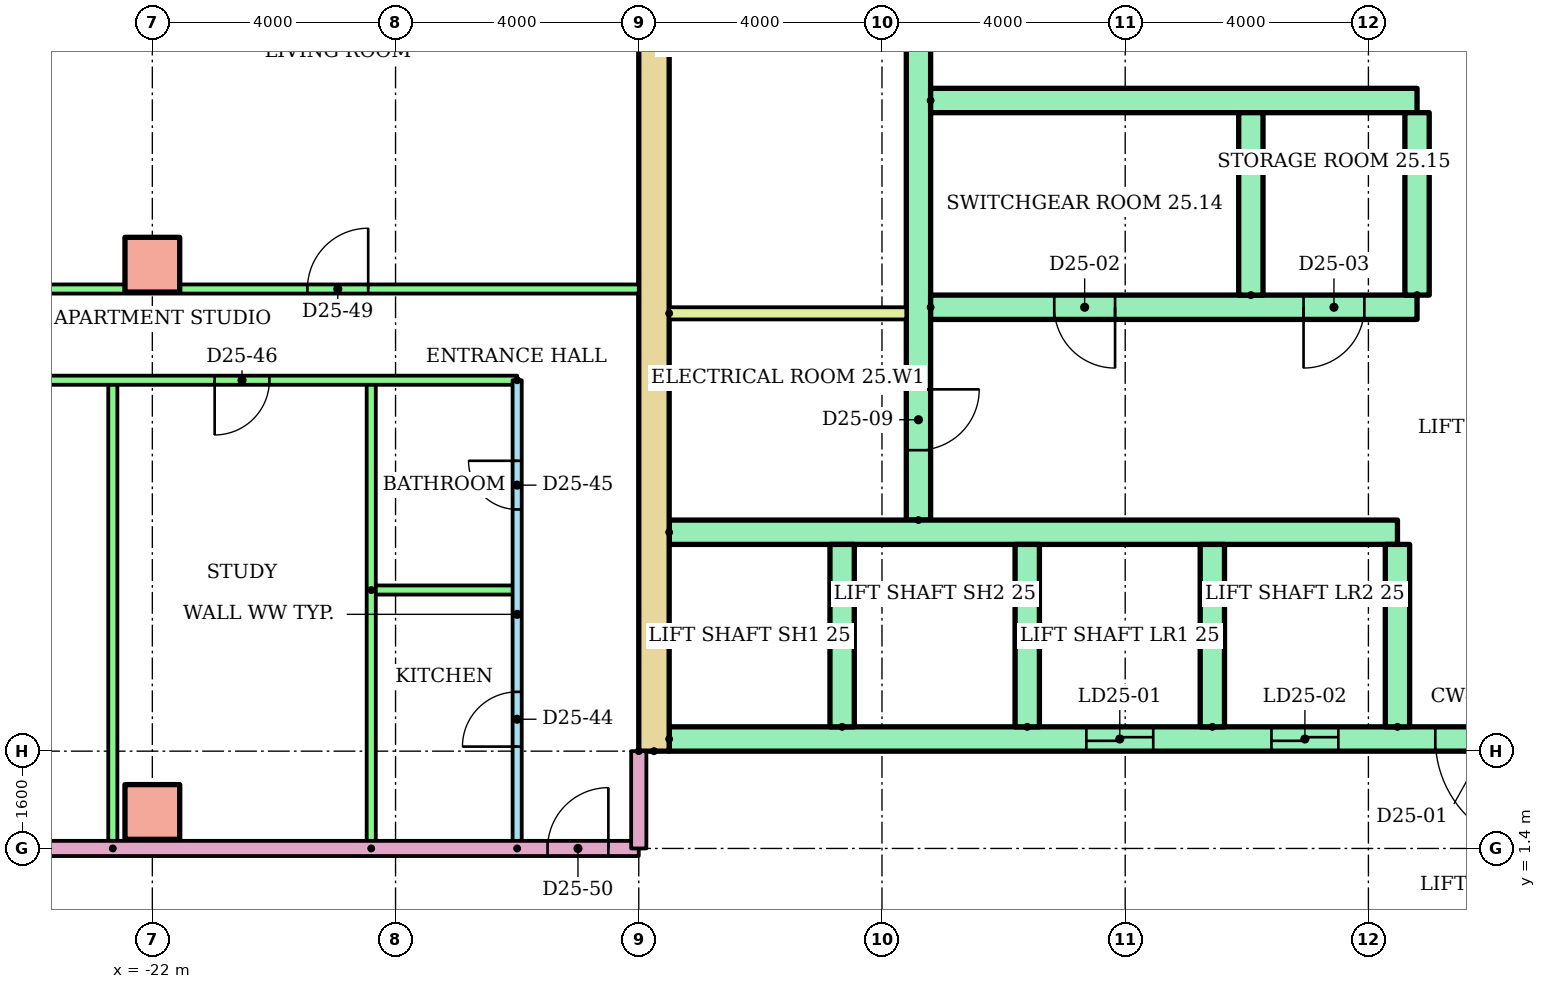
"""IFC4 building model, lengths in metres.
Left out: names, types, materials, properties, quantities, classifications, styles, units other than length and angle.
Written with IfcOpenShell. Run it as: python <this file> out.ifc"""

import sys

from ifc_helpers import new_model, si_unit, direction, frame, frame_2d, origin, origin_2d, place, context, subcontext, project, spatial, rectangle, extrude, element, fill, save


model = new_model("IFC4")
c1 = context("Model", 3, precision=1e-05, world=origin(), true_north=direction((0.0, 1.0)))
c2 = subcontext(c1, "Body", "Model", "MODEL_VIEW")
j1 = project(units=[si_unit("LENGTHUNIT", "METRE"), si_unit("PLANEANGLEUNIT", "RADIAN")], contexts=[c1])
p1 = place(None, origin())
s1 = spatial("IfcSite", under=j1, at=p1, CompositionType="ELEMENT")
p2 = place(p1, origin())
s2 = spatial("IfcBuilding", under=s1, at=p2, CompositionType="ELEMENT")
p3 = place(p2, frame((0.0, 0.0, 96.7)))
s3 = spatial("IfcBuildingStorey", under=s2, at=p3, CompositionType="ELEMENT", Elevation=96.7)
for number, where in (
    (1, (-22.0, 2.0, 0.0)),
    (2, (-22.0, 11.0, 0.0)),
):
    element("IfcColumn", number, at=place(p3, frame(where)), inside=s3, PredefinedType="COLUMN", context=c2, shape_type="SweptSolid", body=[
        extrude(rectangle(XDim=0.9, YDim=0.9, at=origin_2d()), origin(), (0.0, 0.0, 1.0), 3.2),
    ])
p4 = place(p3, frame((-13.75, 3.0, 0.0), z_axis=(0.0, 0.0, 1.0), x_axis=(0.0, 1.0, 0.0)))
e3 = element("IfcWall", 3, at=p4, inside=s3, PredefinedType="SHEAR", context=c2, shape_type="SweptSolid", body=[
    extrude(rectangle(XDim=17.0, YDim=0.5, at=frame_2d((8.5, 0.0))), origin(), (0.0, 0.0, 1.0), 2.92),
])
p5 = place(p3, frame((-9.4, 6.8, 0.0), z_axis=(0.0, 0.0, 1.0), x_axis=(0.0, 1.0, 0.0)))
e4 = element("IfcWall", 4, at=p5, inside=s3, PredefinedType="SHEAR", context=c2, shape_type="SweptSolid", body=[
    extrude(rectangle(XDim=12.7, YDim=0.4, at=frame_2d((6.35, 0.0))), origin(), (0.0, 0.0, 1.0), 2.92),
])
p6 = place(p5, frame((1.15, 0.0, 0.0)))
e5 = element("IfcOpeningElement", 5, at=p6, cuts=e4, PredefinedType="OPENING", context=c2, shape_type="SweptSolid", body=[
    extrude(rectangle(XDim=1.0, YDim=2.1, at=frame_2d((0.5, 1.05))), frame((0.0, 0.21, 0.0), z_axis=(0.0, -1.0, 0.0), x_axis=(1.0, 0.0, 0.0)), (0.0, 0.0, 1.0), 0.42),
])
p7 = place(p5, frame((7.925, 0.0, 0.0)))
e6 = element("IfcOpeningElement", 6, at=p7, cuts=e4, PredefinedType="OPENING", context=c2, shape_type="SweptSolid", body=[
    extrude(rectangle(XDim=1.0, YDim=2.1, at=frame_2d((0.5, 1.05))), frame((0.0, 0.21, 0.0), z_axis=(0.0, -1.0, 0.0), x_axis=(1.0, 0.0, 0.0)), (0.0, 0.0, 1.0), 0.42),
])
p8 = place(p3, frame((-13.5, 3.2, 0.0)))
e7 = element("IfcWall", 7, at=p8, inside=s3, PredefinedType="SHEAR", context=c2, shape_type="SweptSolid", body=[
    extrude(rectangle(XDim=27.0, YDim=0.4, at=frame_2d((13.5, 0.0))), origin(), (0.0, 0.0, 1.0), 2.92),
])
p9 = place(p8, frame((6.861, 0.0, 0.0)))
e8 = element("IfcOpeningElement", 8, at=p9, cuts=e7, PredefinedType="OPENING", context=c2, shape_type="SweptSolid", body=[
    extrude(rectangle(XDim=1.1, YDim=2.1, at=frame_2d((0.55, 1.05))), frame((0.0, 0.21, 0.0), z_axis=(0.0, -1.0, 0.0), x_axis=(1.0, 0.0, 0.0)), (0.0, 0.0, 1.0), 0.42),
])
p10 = place(p8, frame((9.906, 0.0, 0.0)))
e9 = element("IfcOpeningElement", 9, at=p10, cuts=e7, PredefinedType="OPENING", context=c2, shape_type="SweptSolid", body=[
    extrude(rectangle(XDim=1.1, YDim=2.1, at=frame_2d((0.55, 1.05))), frame((0.0, 0.21, 0.0), z_axis=(0.0, -1.0, 0.0), x_axis=(1.0, 0.0, 0.0)), (0.0, 0.0, 1.0), 0.42),
])
p11 = place(p8, frame((15.994, 0.0, 0.0)))
e10 = element("IfcOpeningElement", 10, at=p11, cuts=e7, PredefinedType="OPENING", context=c2, shape_type="SweptSolid", body=[
    extrude(rectangle(XDim=1.1, YDim=2.1, at=frame_2d((0.55, 1.05))), frame((0.0, 0.21, 0.0), z_axis=(0.0, -1.0, 0.0), x_axis=(1.0, 0.0, 0.0)), (0.0, 0.0, 1.0), 0.42),
])
p12 = place(p8, frame((19.039, 0.0, 0.0)))
e11 = element("IfcOpeningElement", 11, at=p12, cuts=e7, PredefinedType="OPENING", context=c2, shape_type="SweptSolid", body=[
    extrude(rectangle(XDim=1.1, YDim=2.1, at=frame_2d((0.55, 1.05))), frame((0.0, 0.21, 0.0), z_axis=(0.0, -1.0, 0.0), x_axis=(1.0, 0.0, 0.0)), (0.0, 0.0, 1.0), 0.42),
])
p13 = place(p8, frame((12.6, 0.0, 0.0)))
e12 = element("IfcOpeningElement", 12, at=p13, cuts=e7, PredefinedType="OPENING", context=c2, shape_type="SweptSolid", body=[
    extrude(rectangle(XDim=1.8, YDim=2.1, at=frame_2d((0.9, 1.05))), frame((0.0, 0.21, 0.0), z_axis=(0.0, -1.0, 0.0), x_axis=(1.0, 0.0, 0.0)), (0.0, 0.0, 1.0), 0.42),
])
p14 = place(p3, frame((-13.5, 6.6, 0.0)))
e13 = element("IfcWall", 13, at=p14, inside=s3, PredefinedType="SHEAR", context=c2, shape_type="SweptSolid", body=[
    extrude(rectangle(XDim=11.978, YDim=0.4, at=frame_2d((5.989, 0.0))), origin(), (0.0, 0.0, 1.0), 2.92),
])
for number, where, z_axis, x_axis in (
    (14, (-10.656, 3.4, 0.0), (0.0, 0.0, 1.0), (0.0, 1.0, 0.0)),
    (15, (-7.611, 3.4, 0.0), (0.0, 0.0, 1.0), (0.0, 1.0, 0.0)),
    (16, (-4.567, 3.4, 0.0), (0.0, 0.0, 1.0), (0.0, 1.0, 0.0)),
    (17, (-1.522, 3.4, 0.0), (0.0, 0.0, 1.0), (0.0, 1.0, 0.0)),
):
    element("IfcWall", number, at=place(p3, frame(where, z_axis=z_axis, x_axis=x_axis)), inside=s3, PredefinedType="SHEAR", context=c2, shape_type="SweptSolid", body=[
        extrude(rectangle(XDim=3.0, YDim=0.4, at=frame_2d((1.5, 0.0))), origin(), (0.0, 0.0, 1.0), 2.92),
    ])
p15 = place(p3, frame((-9.2, 10.3, 0.0)))
e18 = element("IfcWall", 18, at=p15, inside=s3, PredefinedType="SHEAR", context=c2, shape_type="SweptSolid", body=[
    extrude(rectangle(XDim=8.0, YDim=0.4, at=frame_2d((4.0, 0.0))), origin(), (0.0, 0.0, 1.0), 2.92),
])
p16 = place(p15, frame((2.033, 0.0, 0.0)))
e19 = element("IfcOpeningElement", 19, at=p16, cuts=e18, PredefinedType="OPENING", context=c2, shape_type="SweptSolid", body=[
    extrude(rectangle(XDim=1.0, YDim=2.1, at=frame_2d((0.5, 1.05))), frame((0.0, 0.21, 0.0), z_axis=(0.0, -1.0, 0.0), x_axis=(1.0, 0.0, 0.0)), (0.0, 0.0, 1.0), 0.42),
])
p17 = place(p15, frame((6.133, 0.0, 0.0)))
e20 = element("IfcOpeningElement", 20, at=p17, cuts=e18, PredefinedType="OPENING", context=c2, shape_type="SweptSolid", body=[
    extrude(rectangle(XDim=1.0, YDim=2.1, at=frame_2d((0.5, 1.05))), frame((0.0, 0.21, 0.0), z_axis=(0.0, -1.0, 0.0), x_axis=(1.0, 0.0, 0.0)), (0.0, 0.0, 1.0), 0.42),
])
p18 = place(p3, frame((-9.2, 13.7, 0.0)))
e21 = element("IfcWall", 21, at=p18, inside=s3, PredefinedType="SHEAR", context=c2, shape_type="SweptSolid", body=[
    extrude(rectangle(XDim=8.0, YDim=0.4, at=frame_2d((4.0, 0.0))), origin(), (0.0, 0.0, 1.0), 2.92),
])
for number, where, z_axis, x_axis in (
    (22, (-3.933, 10.5, 0.0), (0.0, 0.0, 1.0), (0.0, 1.0, 0.0)),
    (23, (-1.2, 10.5, 0.0), (0.0, 0.0, 1.0), (0.0, 1.0, 0.0)),
):
    element("IfcWall", number, at=place(p3, frame(where, z_axis=z_axis, x_axis=x_axis)), inside=s3, PredefinedType="SHEAR", context=c2, shape_type="SweptSolid", body=[
        extrude(rectangle(XDim=3.0, YDim=0.4, at=frame_2d((1.5, 0.0))), origin(), (0.0, 0.0, 1.0), 2.92),
    ])
p19 = place(p3, frame((-13.5, 10.2, 0.0)))
e24 = element("IfcWall", 24, at=p19, inside=s3, PredefinedType="PARTITIONING", context=c2, shape_type="SweptSolid", body=[
    extrude(rectangle(XDim=3.9, YDim=0.2, at=frame_2d((1.95, 0.0))), origin(), (0.0, 0.0, 1.0), 2.92),
])
p20 = place(p3, frame((-16.0, 1.4, 0.0), z_axis=(0.0, 0.0, 1.0), x_axis=(0.0, 1.0, 0.0)))
e25 = element("IfcWall", 25, at=p20, inside=s3, PredefinedType="PARTITIONING", context=c2, shape_type="SweptSolid", body=[
    extrude(rectangle(XDim=7.7, YDim=0.15, at=frame_2d((3.85, 0.0))), origin(), (0.0, 0.0, 1.0), 2.4),
])
p21 = place(p20, frame((1.675, 0.0, 0.0)))
e26 = element("IfcOpeningElement", 26, at=p21, cuts=e25, PredefinedType="OPENING", context=c2, shape_type="SweptSolid", body=[
    extrude(rectangle(XDim=0.9, YDim=2.1, at=frame_2d((0.45, 1.05))), frame((0.0, 0.085, 0.0), z_axis=(0.0, -1.0, 0.0), x_axis=(1.0, 0.0, 0.0)), (0.0, 0.0, 1.0), 0.17),
])
p22 = place(p20, frame((5.575, 0.0, 0.0)))
e27 = element("IfcOpeningElement", 27, at=p22, cuts=e25, PredefinedType="OPENING", context=c2, shape_type="SweptSolid", body=[
    extrude(rectangle(XDim=0.8, YDim=2.1, at=frame_2d((0.4, 1.05))), frame((0.0, 0.085, 0.0), z_axis=(0.0, -1.0, 0.0), x_axis=(1.0, 0.0, 0.0)), (0.0, 0.0, 1.0), 0.17),
])
p23 = place(p3, frame((-18.4, 5.65, 0.0)))
e28 = element("IfcWall", 28, at=p23, inside=s3, PredefinedType="PARTITIONING", context=c2, shape_type="SweptSolid", body=[
    extrude(rectangle(XDim=2.4, YDim=0.15, at=frame_2d((1.2, 0.0))), origin(), (0.0, 0.0, 1.0), 2.4),
])
for number, where, z_axis, x_axis in (
    (29, (-18.4, 1.4, 0.0), (0.0, 0.0, 1.0), (0.0, 1.0, 0.0)),
    (30, (-22.65, 1.4, 0.0), (0.0, 0.0, 1.0), (0.0, 1.0, 0.0)),
):
    element("IfcWall", number, at=place(p3, frame(where, z_axis=z_axis, x_axis=x_axis)), inside=s3, PredefinedType="PARTITIONING", context=c2, shape_type="SweptSolid", body=[
        extrude(rectangle(XDim=7.7, YDim=0.15, at=frame_2d((3.85, 0.0))), origin(), (0.0, 0.0, 1.0), 2.4),
    ])
p24 = place(p3, frame((-16.0, 9.1, 0.0), z_axis=(0.0, 0.0, 1.0), x_axis=(-1.0, 0.0, 0.0)))
e31 = element("IfcWall", 31, at=p24, inside=s3, PredefinedType="PARTITIONING", context=c2, shape_type="SweptSolid", body=[
    extrude(rectangle(XDim=12.62, YDim=0.15, at=frame_2d((6.31, 0.0))), origin(), (0.0, 0.0, 1.0), 2.4),
])
p25 = place(p24, frame((4.075, 0.0, 0.0)))
e32 = element("IfcOpeningElement", 32, at=p25, cuts=e31, PredefinedType="OPENING", context=c2, shape_type="SweptSolid", body=[
    extrude(rectangle(XDim=0.9, YDim=2.1, at=frame_2d((0.45, 1.05))), frame((0.0, 0.085, 0.0), z_axis=(0.0, -1.0, 0.0), x_axis=(1.0, 0.0, 0.0)), (0.0, 0.0, 1.0), 0.17),
])
p26 = place(p24, frame((9.075, 0.0, 0.0)))
e33 = element("IfcOpeningElement", 33, at=p26, cuts=e31, PredefinedType="OPENING", context=c2, shape_type="SweptSolid", body=[
    extrude(rectangle(XDim=0.9, YDim=2.1, at=frame_2d((0.45, 1.05))), frame((0.0, 0.085, 0.0), z_axis=(0.0, -1.0, 0.0), x_axis=(1.0, 0.0, 0.0)), (0.0, 0.0, 1.0), 0.17),
])
p27 = place(p3, frame((-28.62, 10.6, 0.0)))
e34 = element("IfcWall", 34, at=p27, inside=s3, PredefinedType="PARTITIONING", context=c2, shape_type="SweptSolid", body=[
    extrude(rectangle(XDim=14.62, YDim=0.15, at=frame_2d((7.31, 0.0))), origin(), (0.0, 0.0, 1.0), 2.4),
])
p28 = place(p27, frame((1.97, 0.0, 0.0)))
e35 = element("IfcOpeningElement", 35, at=p28, cuts=e34, PredefinedType="OPENING", context=c2, shape_type="SweptSolid", body=[
    extrude(rectangle(XDim=1.0, YDim=2.1, at=frame_2d((0.5, 1.05))), frame((0.0, 0.085, 0.0), z_axis=(0.0, -1.0, 0.0), x_axis=(1.0, 0.0, 0.0)), (0.0, 0.0, 1.0), 0.17),
])
p29 = place(p27, frame((9.17, 0.0, 0.0)))
e36 = element("IfcOpeningElement", 36, at=p29, cuts=e34, PredefinedType="OPENING", context=c2, shape_type="SweptSolid", body=[
    extrude(rectangle(XDim=1.0, YDim=2.1, at=frame_2d((0.5, 1.05))), frame((0.0, 0.085, 0.0), z_axis=(0.0, -1.0, 0.0), x_axis=(1.0, 0.0, 0.0)), (0.0, 0.0, 1.0), 0.17),
])
p30 = place(p3, frame((-28.62, 1.4, 0.0)))
e37 = element("IfcWall", 37, at=p30, inside=s3, PredefinedType="PARTITIONING", context=c2, shape_type="SweptSolid", body=[
    extrude(rectangle(XDim=14.62, YDim=0.25, at=frame_2d((7.31, 0.0))), origin(), (0.0, 0.0, 1.0), 2.4),
])
p31 = place(p30, frame((13.12, 0.0, 0.0)))
e38 = element("IfcOpeningElement", 38, at=p31, cuts=e37, PredefinedType="OPENING", context=c2, shape_type="SweptSolid", body=[
    extrude(rectangle(XDim=1.0, YDim=2.1, at=frame_2d((0.5, 1.05))), frame((0.0, 0.135, 0.0), z_axis=(0.0, -1.0, 0.0), x_axis=(1.0, 0.0, 0.0)), (0.0, 0.0, 1.0), 0.27),
])
p32 = place(p3, frame((-14.0, 3.0, 0.0), z_axis=(0.0, 0.0, 1.0), x_axis=(0.0, -1.0, 0.0)))
e39 = element("IfcWall", 39, at=p32, inside=s3, PredefinedType="PARTITIONING", context=c2, shape_type="SweptSolid", body=[
    extrude(rectangle(XDim=1.6, YDim=0.25, at=frame_2d((0.8, 0.0))), origin(), (0.0, 0.0, 1.0), 2.4),
])
p33 = place(p9, origin())
e40 = element("IfcDoor", 40, at=p33, inside=s3, OperationType="SLIDING_TO_LEFT", PredefinedType="DOOR", context=c2, shape_type="SweptSolid", body=[
    extrude(rectangle(XDim=1.1, YDim=2.1, at=frame_2d((0.55, 1.05))), frame((0.0, 0.025, 0.0), z_axis=(0.0, -1.0, 0.0), x_axis=(1.0, 0.0, 0.0)), (0.0, 0.0, 1.0), 0.05),
])
fill(e8, e40)
p34 = place(p10, origin())
e41 = element("IfcDoor", 41, at=p34, inside=s3, OperationType="SLIDING_TO_LEFT", PredefinedType="DOOR", context=c2, shape_type="SweptSolid", body=[
    extrude(rectangle(XDim=1.1, YDim=2.1, at=frame_2d((0.55, 1.05))), frame((0.0, 0.025, 0.0), z_axis=(0.0, -1.0, 0.0), x_axis=(1.0, 0.0, 0.0)), (0.0, 0.0, 1.0), 0.05),
])
fill(e9, e41)
p35 = place(p13, frame((1.8, 0.0, 0.0), z_axis=(0.0, 0.0, 1.0), x_axis=(-1.0, 0.0, 0.0)))
e42 = element("IfcDoor", 42, at=p35, inside=s3, OperationType="DOUBLE_DOOR_SINGLE_SWING", PredefinedType="DOOR", context=c2, shape_type="SweptSolid", body=[
    extrude(rectangle(XDim=1.8, YDim=2.1, at=frame_2d((0.9, 1.05))), frame((0.0, 0.025, 0.0), z_axis=(0.0, -1.0, 0.0), x_axis=(1.0, 0.0, 0.0)), (0.0, 0.0, 1.0), 0.05),
])
fill(e12, e42)
p36 = place(p16, frame((1.0, 0.0, 0.0), z_axis=(0.0, 0.0, 1.0), x_axis=(-1.0, 0.0, 0.0)))
e43 = element("IfcDoor", 43, at=p36, inside=s3, OperationType="SINGLE_SWING_RIGHT", PredefinedType="DOOR", context=c2, shape_type="SweptSolid", body=[
    extrude(rectangle(XDim=1.0, YDim=2.1, at=frame_2d((0.5, 1.05))), frame((0.0, 0.025, 0.0), z_axis=(0.0, -1.0, 0.0), x_axis=(1.0, 0.0, 0.0)), (0.0, 0.0, 1.0), 0.05),
])
fill(e19, e43)
p37 = place(p17, frame((1.0, 0.0, 0.0), z_axis=(0.0, 0.0, 1.0), x_axis=(-1.0, 0.0, 0.0)))
e44 = element("IfcDoor", 44, at=p37, inside=s3, OperationType="SINGLE_SWING_LEFT", PredefinedType="DOOR", context=c2, shape_type="SweptSolid", body=[
    extrude(rectangle(XDim=1.0, YDim=2.1, at=frame_2d((0.5, 1.05))), frame((0.0, 0.025, 0.0), z_axis=(0.0, -1.0, 0.0), x_axis=(1.0, 0.0, 0.0)), (0.0, 0.0, 1.0), 0.05),
])
fill(e20, e44)
p38 = place(p6, frame((1.0, 0.0, 0.0), z_axis=(0.0, 0.0, 1.0), x_axis=(-1.0, 0.0, 0.0)))
e45 = element("IfcDoor", 45, at=p38, inside=s3, OperationType="SINGLE_SWING_RIGHT", PredefinedType="DOOR", context=c2, shape_type="SweptSolid", body=[
    extrude(rectangle(XDim=1.0, YDim=2.1, at=frame_2d((0.5, 1.05))), frame((0.0, 0.025, 0.0), z_axis=(0.0, -1.0, 0.0), x_axis=(1.0, 0.0, 0.0)), (0.0, 0.0, 1.0), 0.05),
])
fill(e5, e45)
p39 = place(p21, origin())
e46 = element("IfcDoor", 46, at=p39, inside=s3, OperationType="SINGLE_SWING_LEFT", PredefinedType="DOOR", context=c2, shape_type="SweptSolid", body=[
    extrude(rectangle(XDim=0.9, YDim=2.1, at=frame_2d((0.45, 1.05))), frame((0.0, 0.025, 0.0), z_axis=(0.0, -1.0, 0.0), x_axis=(1.0, 0.0, 0.0)), (0.0, 0.0, 1.0), 0.05),
])
fill(e26, e46)
p40 = place(p22, origin())
e47 = element("IfcDoor", 47, at=p40, inside=s3, OperationType="SINGLE_SWING_RIGHT", PredefinedType="DOOR", context=c2, shape_type="SweptSolid", body=[
    extrude(rectangle(XDim=0.8, YDim=2.1, at=frame_2d((0.4, 1.05))), frame((0.0, 0.025, 0.0), z_axis=(0.0, -1.0, 0.0), x_axis=(1.0, 0.0, 0.0)), (0.0, 0.0, 1.0), 0.05),
])
fill(e27, e47)
p41 = place(p25, origin())
e48 = element("IfcDoor", 48, at=p41, inside=s3, OperationType="SINGLE_SWING_RIGHT", PredefinedType="DOOR", context=c2, shape_type="SweptSolid", body=[
    extrude(rectangle(XDim=0.9, YDim=2.1, at=frame_2d((0.45, 1.05))), frame((0.0, 0.025, 0.0), z_axis=(0.0, -1.0, 0.0), x_axis=(1.0, 0.0, 0.0)), (0.0, 0.0, 1.0), 0.05),
])
fill(e32, e48)
p42 = place(p29, origin())
e49 = element("IfcDoor", 49, at=p42, inside=s3, OperationType="SINGLE_SWING_RIGHT", PredefinedType="DOOR", context=c2, shape_type="SweptSolid", body=[
    extrude(rectangle(XDim=1.0, YDim=2.1, at=frame_2d((0.5, 1.05))), frame((0.0, 0.025, 0.0), z_axis=(0.0, -1.0, 0.0), x_axis=(1.0, 0.0, 0.0)), (0.0, 0.0, 1.0), 0.05),
])
fill(e36, e49)
p43 = place(p31, origin())
e50 = element("IfcDoor", 50, at=p43, inside=s3, OperationType="SINGLE_SWING_RIGHT", PredefinedType="DOOR", context=c2, shape_type="SweptSolid", body=[
    extrude(rectangle(XDim=1.0, YDim=2.1, at=frame_2d((0.5, 1.05))), frame((0.0, 0.025, 0.0), z_axis=(0.0, -1.0, 0.0), x_axis=(1.0, 0.0, 0.0)), (0.0, 0.0, 1.0), 0.05),
])
fill(e38, e50)
save(model, sys.argv[1])
